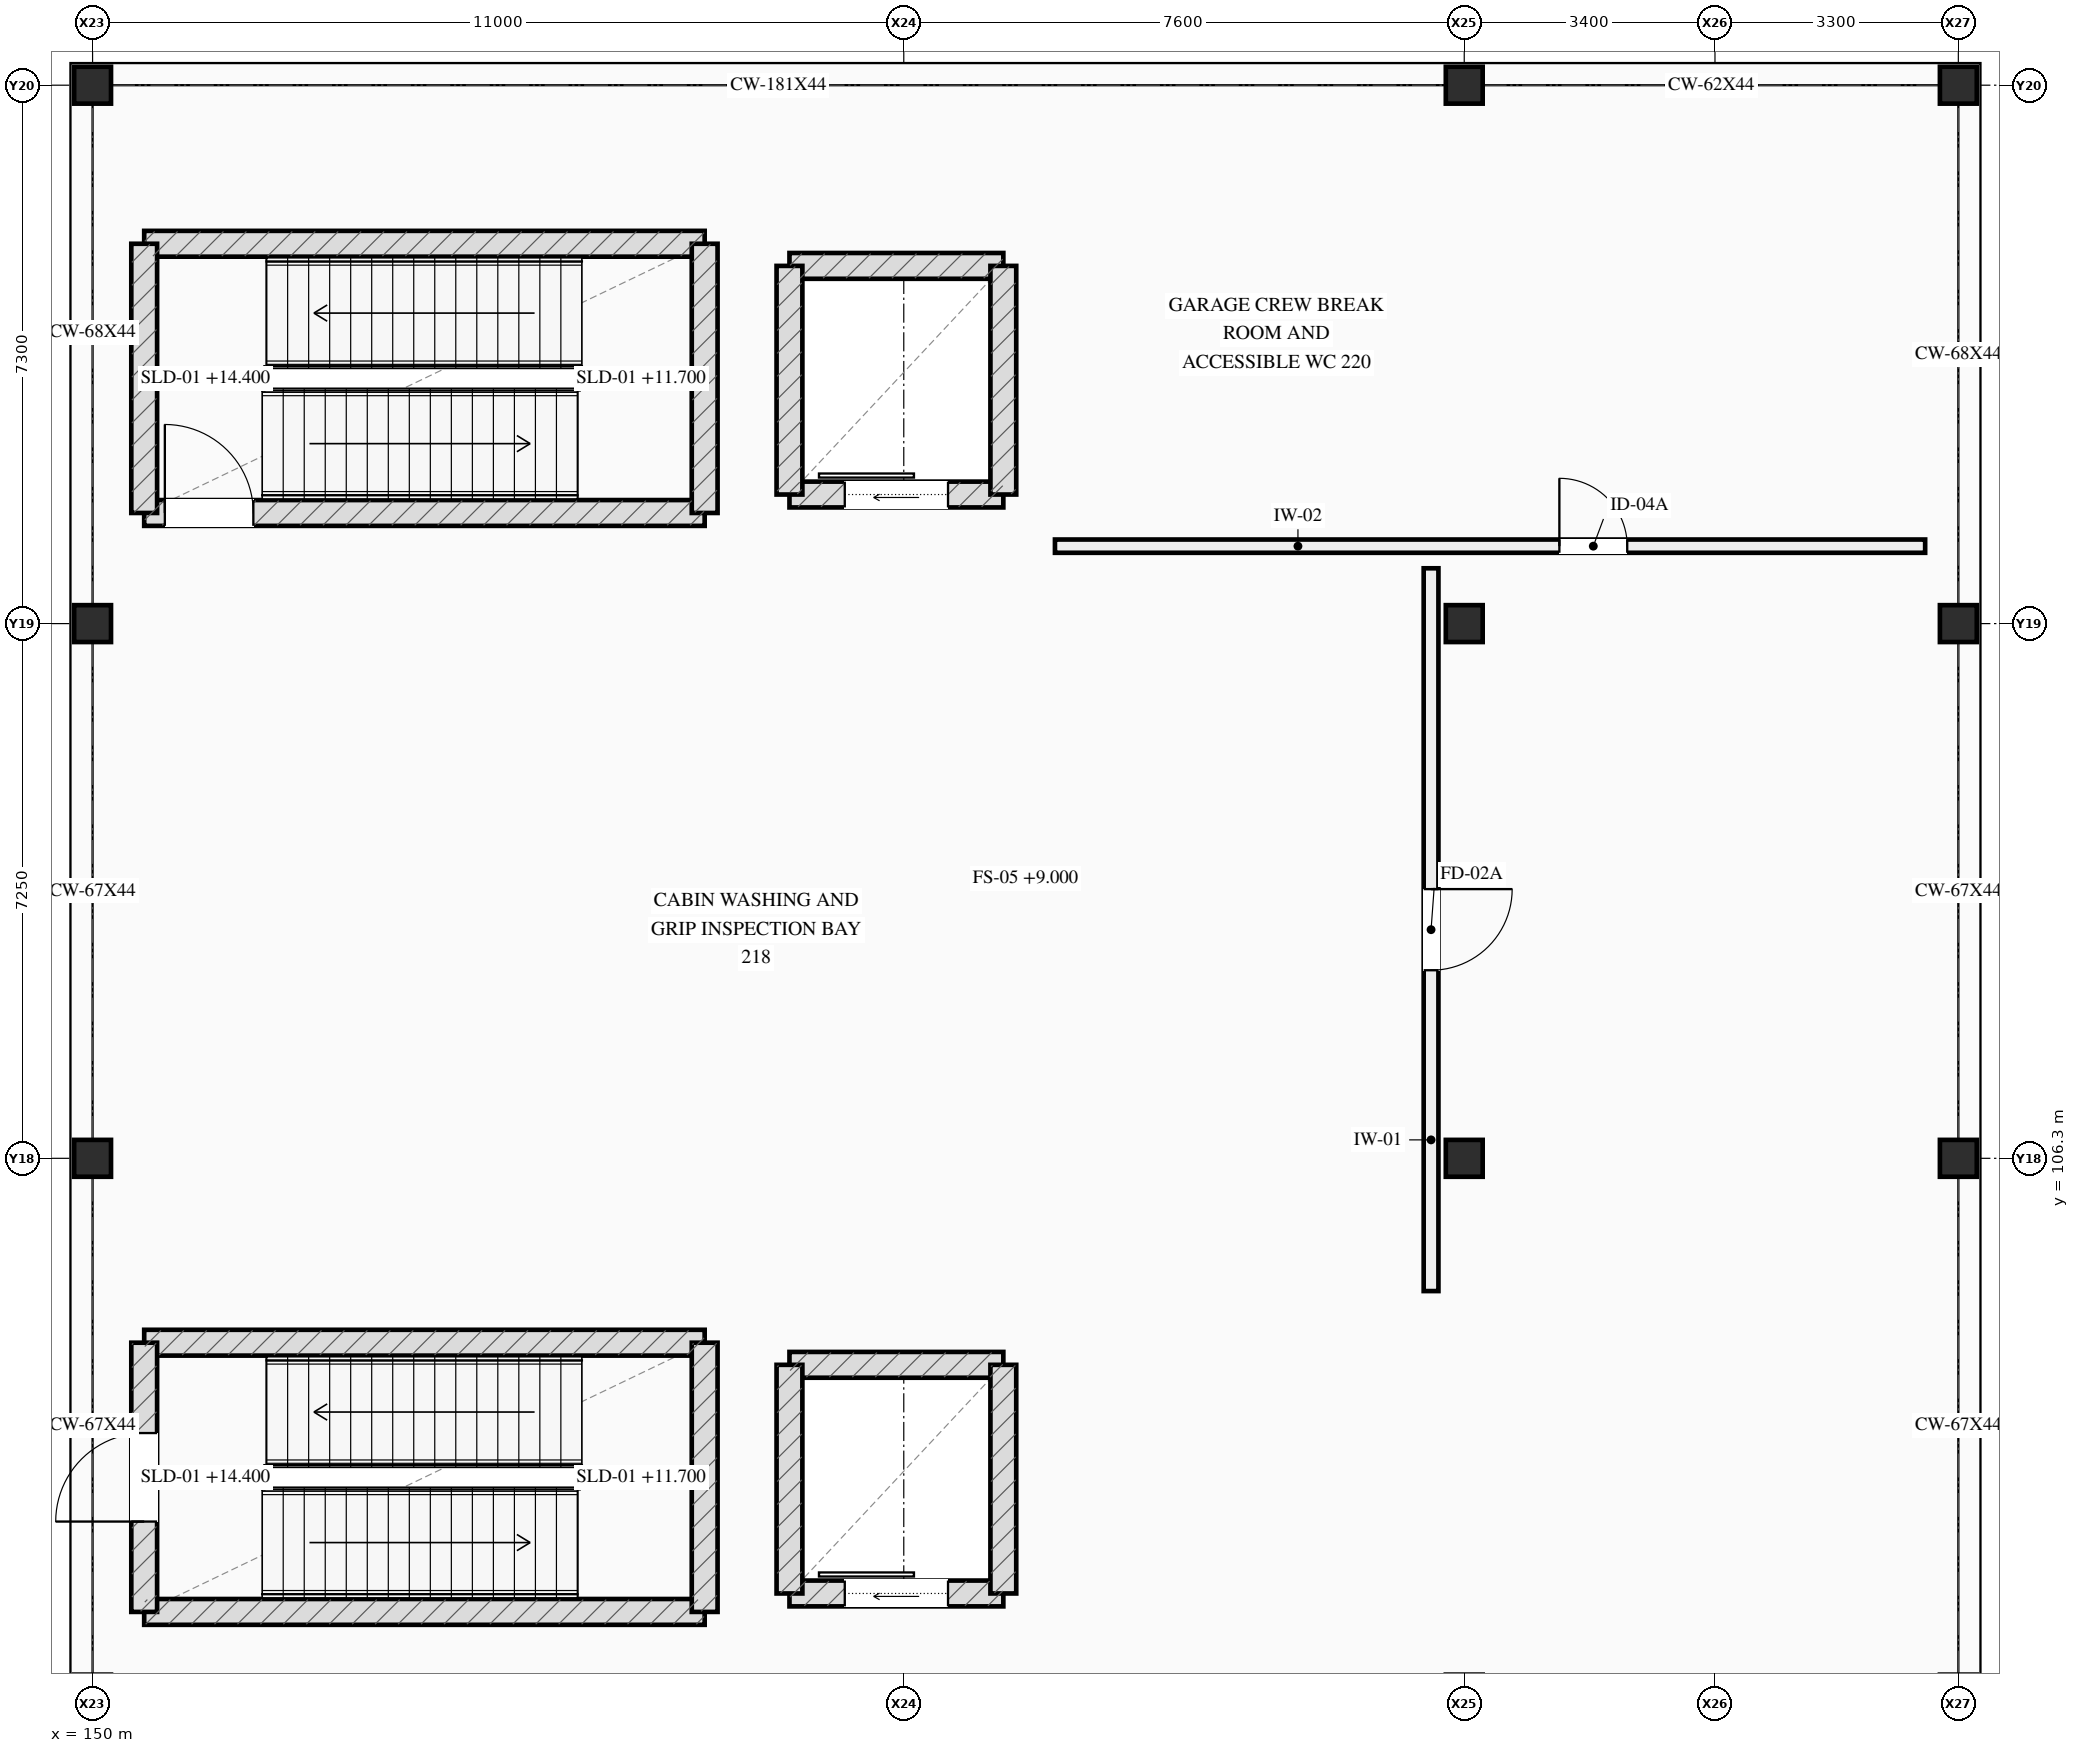
"""IFC4 building model, lengths in metres.
Left out: names, types, materials, properties, quantities, classifications, styles, units other than length and angle.
Written with IfcOpenShell. Run it as: python <this file> out.ifc"""

import sys

from ifc_helpers import new_model, si_unit, direction, frame, frame_2d, origin, origin_2d, place, context, subcontext, project, spatial, rectangle, extrude, element, fill, save


model = new_model("IFC4")
c1 = context("Model", 3, precision=1e-05, world=origin(), true_north=direction((0.0, 1.0)))
c2 = subcontext(c1, "Body", "Model", "MODEL_VIEW")
j1 = project(units=[si_unit("LENGTHUNIT", "METRE"), si_unit("PLANEANGLEUNIT", "RADIAN")], contexts=[c1])
p1 = place(None, origin())
s1 = spatial("IfcSite", under=j1, at=p1, CompositionType="ELEMENT")
p2 = place(p1, origin())
s2 = spatial("IfcBuilding", under=s1, at=p2, CompositionType="ELEMENT")
p3 = place(p2, frame((0.0, 0.0, 9.0)))
s3 = spatial("IfcBuildingStorey", under=s2, at=p3, CompositionType="ELEMENT", Elevation=9.0)
for number, where, z_axis, x_axis in (
    (1, (150.0, 106.3, 0.0), (0.0, 0.0, 1.0), (1.0, 0.0, 0.0)),
    (2, (150.0, 113.55, 0.0), (0.0, 0.0, 1.0), (1.0, 0.0, 0.0)),
    (3, (150.0, 120.85, 0.0), (0.0, 0.0, 1.0), (1.0, 0.0, 0.0)),
    (4, (168.6, 106.3, 0.0), (0.0, 0.0, 1.0), (1.0, 0.0, 0.0)),
    (5, (168.6, 113.55, 0.0), (0.0, 0.0, 1.0), (1.0, 0.0, 0.0)),
    (6, (168.6, 120.85, 0.0), (0.0, 0.0, 1.0), (1.0, 0.0, 0.0)),
    (7, (175.3, 106.3, 0.0), (0.0, 0.0, 1.0), (1.0, 0.0, 0.0)),
    (8, (175.3, 113.55, 0.0), (0.0, 0.0, 1.0), (1.0, 0.0, 0.0)),
    (9, (175.3, 120.85, 0.0), (0.0, 0.0, 1.0), (1.0, 0.0, 0.0)),
):
    element("IfcColumn", number, at=place(p3, frame(where, z_axis=z_axis, x_axis=x_axis)), inside=s3, PredefinedType="COLUMN", context=c2, shape_type="SweptSolid", body=[
        extrude(rectangle(XDim=0.5, YDim=0.5, at=origin_2d()), origin(), (0.0, 0.0, 1.0), 5.4),
    ])
for number, where, z_axis, x_axis in (
    (10, (150.7, 100.15, 0.0), (0.0, 0.0, 1.0), (1.0, 0.0, 0.0)),
    (11, (158.3, 103.8, 0.0), (0.0, 0.0, 1.0), (-1.0, 0.0, 0.0)),
):
    element("IfcWall", number, at=place(p3, frame(where, z_axis=z_axis, x_axis=x_axis)), inside=s3, PredefinedType="SHEAR", context=c2, shape_type="SweptSolid", body=[
        extrude(rectangle(XDim=7.6, YDim=0.35, at=frame_2d((3.8, 0.0))), origin(), (0.0, 0.0, 1.0), 5.175),
    ])
p4 = place(p3, frame((150.7, 103.8, 0.0), z_axis=(0.0, 0.0, 1.0), x_axis=(0.0, -1.0, 0.0)))
e12 = element("IfcWall", 12, at=p4, inside=s3, PredefinedType="SHEAR", context=c2, shape_type="SweptSolid", body=[
    extrude(rectangle(XDim=3.65, YDim=0.35, at=frame_2d((1.825, 0.0))), origin(), (0.0, 0.0, 1.0), 5.175),
])
p5 = place(p4, frame((1.225, 0.0, 0.0)))
e13 = element("IfcOpeningElement", 13, at=p5, cuts=e12, PredefinedType="OPENING", context=c2, shape_type="SweptSolid", body=[
    extrude(rectangle(XDim=1.2, YDim=2.2, at=frame_2d((0.6, 1.1))), frame((0.0, 0.185, 0.0), z_axis=(0.0, -1.0, 0.0), x_axis=(1.0, 0.0, 0.0)), (0.0, 0.0, 1.0), 0.37),
])
p6 = place(p3, frame((158.3, 100.15, 0.0), z_axis=(0.0, 0.0, 1.0), x_axis=(0.0, 1.0, 0.0)))
e14 = element("IfcWall", 14, at=p6, inside=s3, PredefinedType="SHEAR", context=c2, shape_type="SweptSolid", body=[
    extrude(rectangle(XDim=3.65, YDim=0.35, at=frame_2d((1.825, 0.0))), origin(), (0.0, 0.0, 1.0), 5.175),
])
p7 = place(p3, frame((159.45, 100.4, 0.0), z_axis=(0.0, 0.0, 1.0), x_axis=(1.0, 0.0, 0.0)))
e15 = element("IfcWall", 15, at=p7, inside=s3, PredefinedType="SHEAR", context=c2, shape_type="SweptSolid", body=[
    extrude(rectangle(XDim=2.9, YDim=0.35, at=frame_2d((1.45, 0.0))), origin(), (0.0, 0.0, 1.0), 5.175),
])
p8 = place(p7, frame((0.75, 0.0, 0.0)))
e16 = element("IfcOpeningElement", 16, at=p8, cuts=e15, PredefinedType="OPENING", context=c2, shape_type="SweptSolid", body=[
    extrude(rectangle(XDim=1.4, YDim=2.2, at=frame_2d((0.7, 1.1))), frame((0.0, 0.185, 0.0), z_axis=(0.0, -1.0, 0.0), x_axis=(1.0, 0.0, 0.0)), (0.0, 0.0, 1.0), 0.37),
])
p9 = place(p3, frame((159.45, 103.5, 0.0), z_axis=(0.0, 0.0, 1.0), x_axis=(1.0, 0.0, 0.0)))
e17 = element("IfcWall", 17, at=p9, inside=s3, PredefinedType="SHEAR", context=c2, shape_type="SweptSolid", body=[
    extrude(rectangle(XDim=2.9, YDim=0.35, at=frame_2d((1.45, 0.0))), origin(), (0.0, 0.0, 1.0), 5.175),
])
for number, where, z_axis, x_axis in (
    (18, (159.45, 100.4, 0.0), (0.0, 0.0, 1.0), (0.0, 1.0, 0.0)),
    (19, (162.35, 100.4, 0.0), (0.0, 0.0, 1.0), (0.0, 1.0, 0.0)),
):
    element("IfcWall", number, at=place(p3, frame(where, z_axis=z_axis, x_axis=x_axis)), inside=s3, PredefinedType="SHEAR", context=c2, shape_type="SweptSolid", body=[
        extrude(rectangle(XDim=3.1, YDim=0.35, at=frame_2d((1.55, 0.0))), origin(), (0.0, 0.0, 1.0), 5.175),
    ])
p10 = place(p3, frame((150.7, 115.05, 0.0), z_axis=(0.0, 0.0, 1.0), x_axis=(1.0, 0.0, 0.0)))
e20 = element("IfcWall", 20, at=p10, inside=s3, PredefinedType="SHEAR", context=c2, shape_type="SweptSolid", body=[
    extrude(rectangle(XDim=7.6, YDim=0.35, at=frame_2d((3.8, 0.0))), origin(), (0.0, 0.0, 1.0), 5.175),
])
p11 = place(p10, frame((0.28, 0.0, 0.0)))
e21 = element("IfcOpeningElement", 21, at=p11, cuts=e20, PredefinedType="OPENING", context=c2, shape_type="SweptSolid", body=[
    extrude(rectangle(XDim=1.2, YDim=2.2, at=frame_2d((0.6, 1.1))), frame((0.0, 0.185, 0.0), z_axis=(0.0, -1.0, 0.0), x_axis=(1.0, 0.0, 0.0)), (0.0, 0.0, 1.0), 0.37),
])
p12 = place(p3, frame((158.3, 118.7, 0.0), z_axis=(0.0, 0.0, 1.0), x_axis=(-1.0, 0.0, 0.0)))
e22 = element("IfcWall", 22, at=p12, inside=s3, PredefinedType="SHEAR", context=c2, shape_type="SweptSolid", body=[
    extrude(rectangle(XDim=7.6, YDim=0.35, at=frame_2d((3.8, 0.0))), origin(), (0.0, 0.0, 1.0), 5.175),
])
for number, where, z_axis, x_axis in (
    (23, (150.7, 118.7, 0.0), (0.0, 0.0, 1.0), (0.0, -1.0, 0.0)),
    (24, (158.3, 115.05, 0.0), (0.0, 0.0, 1.0), (0.0, 1.0, 0.0)),
):
    element("IfcWall", number, at=place(p3, frame(where, z_axis=z_axis, x_axis=x_axis)), inside=s3, PredefinedType="SHEAR", context=c2, shape_type="SweptSolid", body=[
        extrude(rectangle(XDim=3.65, YDim=0.35, at=frame_2d((1.825, 0.0))), origin(), (0.0, 0.0, 1.0), 5.175),
    ])
p13 = place(p3, frame((159.45, 115.3, 0.0), z_axis=(0.0, 0.0, 1.0), x_axis=(1.0, 0.0, 0.0)))
e25 = element("IfcWall", 25, at=p13, inside=s3, PredefinedType="SHEAR", context=c2, shape_type="SweptSolid", body=[
    extrude(rectangle(XDim=2.9, YDim=0.35, at=frame_2d((1.45, 0.0))), origin(), (0.0, 0.0, 1.0), 5.175),
])
p14 = place(p13, frame((0.75, 0.0, 0.0)))
e26 = element("IfcOpeningElement", 26, at=p14, cuts=e25, PredefinedType="OPENING", context=c2, shape_type="SweptSolid", body=[
    extrude(rectangle(XDim=1.4, YDim=2.2, at=frame_2d((0.7, 1.1))), frame((0.0, 0.185, 0.0), z_axis=(0.0, -1.0, 0.0), x_axis=(1.0, 0.0, 0.0)), (0.0, 0.0, 1.0), 0.37),
])
p15 = place(p3, frame((159.45, 118.4, 0.0), z_axis=(0.0, 0.0, 1.0), x_axis=(1.0, 0.0, 0.0)))
e27 = element("IfcWall", 27, at=p15, inside=s3, PredefinedType="SHEAR", context=c2, shape_type="SweptSolid", body=[
    extrude(rectangle(XDim=2.9, YDim=0.35, at=frame_2d((1.45, 0.0))), origin(), (0.0, 0.0, 1.0), 5.175),
])
for number, where, z_axis, x_axis in (
    (28, (159.45, 115.3, 0.0), (0.0, 0.0, 1.0), (0.0, 1.0, 0.0)),
    (29, (162.35, 115.3, 0.0), (0.0, 0.0, 1.0), (0.0, 1.0, 0.0)),
):
    element("IfcWall", number, at=place(p3, frame(where, z_axis=z_axis, x_axis=x_axis)), inside=s3, PredefinedType="SHEAR", context=c2, shape_type="SweptSolid", body=[
        extrude(rectangle(XDim=3.1, YDim=0.35, at=frame_2d((1.55, 0.0))), origin(), (0.0, 0.0, 1.0), 5.175),
    ])
p16 = place(p3, frame((168.15, 104.5, 0.0), z_axis=(0.0, 0.0, 1.0), x_axis=(0.0, 1.0, 0.0)))
e30 = element("IfcWall", 30, at=p16, inside=s3, PredefinedType="SOLIDWALL", context=c2, shape_type="SweptSolid", body=[
    extrude(rectangle(XDim=9.8, YDim=0.2, at=frame_2d((4.9, 0.0))), origin(), (0.0, 0.0, 1.0), 3.3),
])
p17 = place(p16, frame((4.35, 0.0, 0.0)))
e31 = element("IfcOpeningElement", 31, at=p17, cuts=e30, PredefinedType="OPENING", context=c2, shape_type="SweptSolid", body=[
    extrude(rectangle(XDim=1.1, YDim=2.2, at=frame_2d((0.55, 1.1))), frame((0.0, 0.11, 0.0), z_axis=(0.0, -1.0, 0.0), x_axis=(1.0, 0.0, 0.0)), (0.0, 0.0, 1.0), 0.22),
])
p18 = place(p3, frame((163.05, 114.6, 0.0), z_axis=(0.0, 0.0, 1.0), x_axis=(1.0, 0.0, 0.0)))
e32 = element("IfcWall", 32, at=p18, inside=s3, PredefinedType="PLUMBINGWALL", context=c2, shape_type="SweptSolid", body=[
    extrude(rectangle(XDim=11.8, YDim=0.18, at=frame_2d((5.9, 0.0))), origin(), (0.0, 0.0, 1.0), 3.3),
])
p19 = place(p18, frame((6.84, 0.0, 0.0)))
e33 = element("IfcOpeningElement", 33, at=p19, cuts=e32, PredefinedType="OPENING", context=c2, shape_type="SweptSolid", body=[
    extrude(rectangle(XDim=0.92, YDim=2.1, at=frame_2d((0.46, 1.05))), frame((0.0, 0.1, 0.0), z_axis=(0.0, -1.0, 0.0), x_axis=(1.0, 0.0, 0.0)), (0.0, 0.0, 1.0), 0.2),
])
p20 = place(p5, origin())
e34 = element("IfcDoor", 34, at=p20, inside=s3, OperationType="SINGLE_SWING_RIGHT", PredefinedType="DOOR", context=c2, shape_type="SweptSolid", body=[
    extrude(rectangle(XDim=1.2, YDim=2.2, at=frame_2d((0.6, 1.1))), frame((0.0, 0.025, 0.0), z_axis=(0.0, -1.0, 0.0), x_axis=(1.0, 0.0, 0.0)), (0.0, 0.0, 1.0), 0.05),
])
fill(e13, e34)
p21 = place(p8, origin())
e35 = element("IfcDoor", 35, at=p21, inside=s3, OperationType="SLIDING_TO_LEFT", PredefinedType="DOOR", context=c2, shape_type="SweptSolid", body=[
    extrude(rectangle(XDim=1.4, YDim=2.2, at=frame_2d((0.7, 1.1))), frame((0.0, 0.025, 0.0), z_axis=(0.0, -1.0, 0.0), x_axis=(1.0, 0.0, 0.0)), (0.0, 0.0, 1.0), 0.05),
])
fill(e16, e35)
p22 = place(p11, origin())
e36 = element("IfcDoor", 36, at=p22, inside=s3, OperationType="SINGLE_SWING_LEFT", PredefinedType="DOOR", context=c2, shape_type="SweptSolid", body=[
    extrude(rectangle(XDim=1.2, YDim=2.2, at=frame_2d((0.6, 1.1))), frame((0.0, 0.025, 0.0), z_axis=(0.0, -1.0, 0.0), x_axis=(1.0, 0.0, 0.0)), (0.0, 0.0, 1.0), 0.05),
])
fill(e21, e36)
p23 = place(p14, origin())
e37 = element("IfcDoor", 37, at=p23, inside=s3, OperationType="SLIDING_TO_LEFT", PredefinedType="DOOR", context=c2, shape_type="SweptSolid", body=[
    extrude(rectangle(XDim=1.4, YDim=2.2, at=frame_2d((0.7, 1.1))), frame((0.0, 0.025, 0.0), z_axis=(0.0, -1.0, 0.0), x_axis=(1.0, 0.0, 0.0)), (0.0, 0.0, 1.0), 0.05),
])
fill(e26, e37)
p24 = place(p17, origin())
e38 = element("IfcDoor", 38, at=p24, inside=s3, OperationType="SINGLE_SWING_RIGHT", PredefinedType="DOOR", context=c2, shape_type="SweptSolid", body=[
    extrude(rectangle(XDim=1.1, YDim=2.2, at=frame_2d((0.55, 1.1))), frame((0.0, 0.025, 0.0), z_axis=(0.0, -1.0, 0.0), x_axis=(1.0, 0.0, 0.0)), (0.0, 0.0, 1.0), 0.05),
])
fill(e31, e38)
p25 = place(p19, origin())
e39 = element("IfcDoor", 39, at=p25, inside=s3, OperationType="SINGLE_SWING_LEFT", PredefinedType="DOOR", context=c2, shape_type="SweptSolid", body=[
    extrude(rectangle(XDim=0.92, YDim=2.1, at=frame_2d((0.46, 1.05))), frame((0.0, 0.025, 0.0), z_axis=(0.0, -1.0, 0.0), x_axis=(1.0, 0.0, 0.0)), (0.0, 0.0, 1.0), 0.05),
])
fill(e33, e39)
save(model, sys.argv[1])
